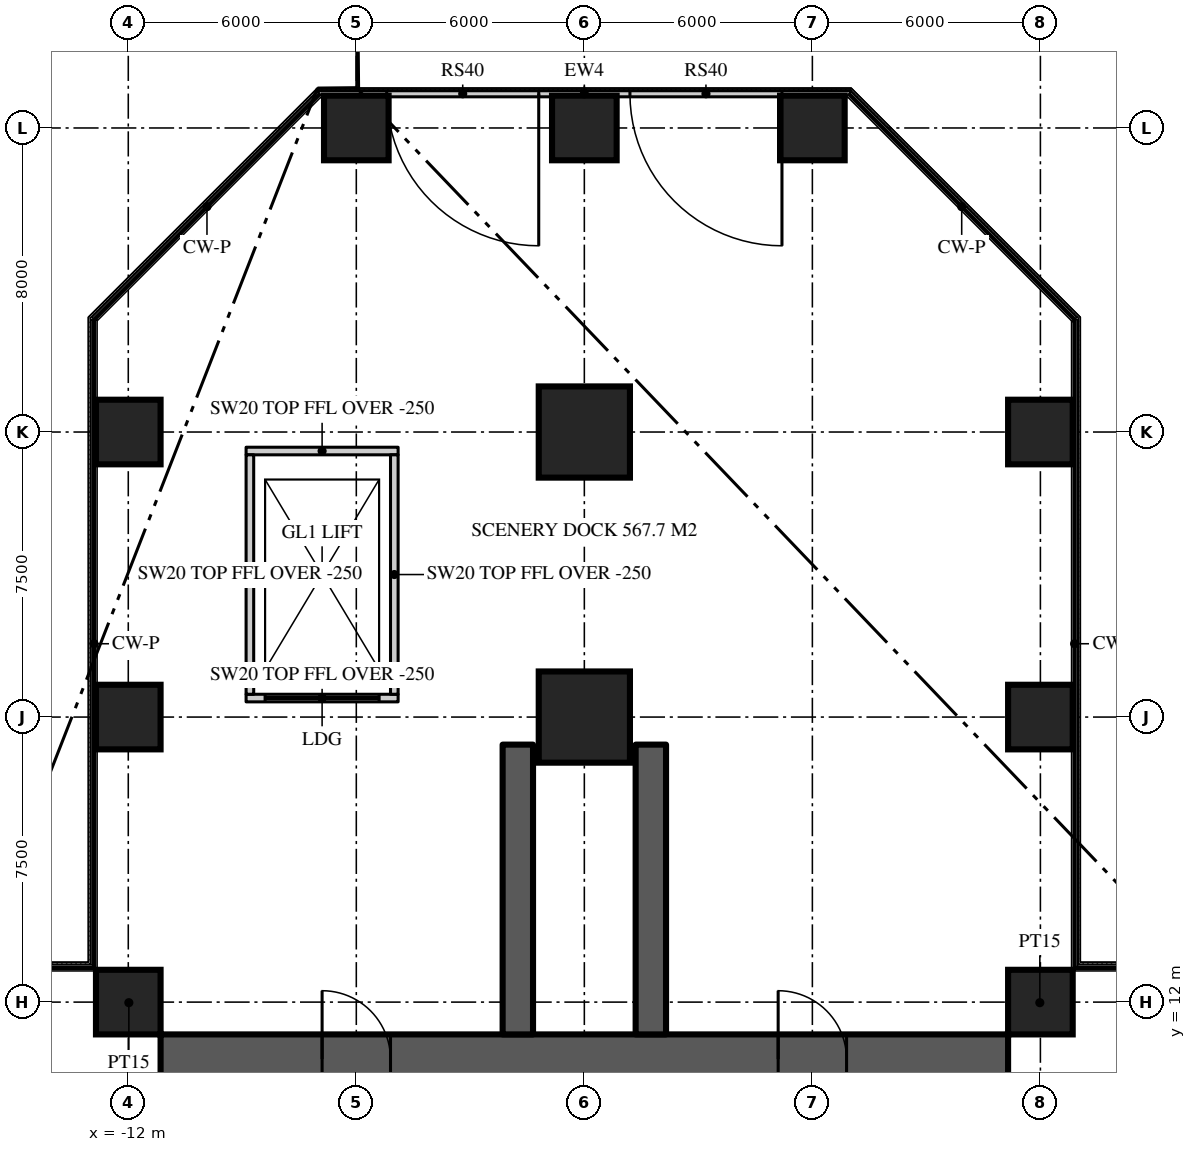
"""IFC4 building model, lengths in metres.
Left out: names, types, materials, properties, quantities, classifications, styles, units other than length and angle.
Written with IfcOpenShell. Run it as: python <this file> out.ifc"""

import sys

from ifc_helpers import new_model, si_unit, direction, frame, frame_2d, origin, origin_2d, place, context, subcontext, project, spatial, rectangle, extrude, element, fill, save


model = new_model("IFC4")
c1 = context("Model", 3, precision=1e-05, world=origin(), true_north=direction((0.0, 1.0)))
c2 = subcontext(c1, "Body", "Model", "MODEL_VIEW")
j1 = project(units=[si_unit("LENGTHUNIT", "METRE"), si_unit("PLANEANGLEUNIT", "RADIAN")], contexts=[c1])
p1 = place(None, origin())
s1 = spatial("IfcSite", under=j1, at=p1, CompositionType="ELEMENT")
p2 = place(p1, origin())
s2 = spatial("IfcBuilding", under=s1, at=p2, CompositionType="ELEMENT")
p3 = place(p2, origin())
s3 = spatial("IfcBuildingStorey", under=s2, at=p3, CompositionType="ELEMENT", Elevation=0.0)
p4 = place(p3, frame((-11.15, 10.5, 0.0), z_axis=(0.0, 0.0, 1.0), x_axis=(1.0, 0.0, 0.0)))
e1 = element("IfcWall", 1, at=p4, inside=s3, PredefinedType="SHEAR", context=c2, shape_type="SweptSolid", body=[
    extrude(rectangle(XDim=22.3, YDim=1.3, at=frame_2d((11.15, 0.0))), origin(), (0.0, 0.0, 1.0), 7.0),
])
p5 = place(p4, frame((4.25, 0.0, 0.0)))
e2 = element("IfcOpeningElement", 2, at=p5, cuts=e1, PredefinedType="OPENING", context=c2, shape_type="SweptSolid", body=[
    extrude(rectangle(XDim=1.8, YDim=2.2, at=frame_2d((0.9, 1.1))), frame((0.0, 0.66, 0.0), z_axis=(0.0, -1.0, 0.0), x_axis=(1.0, 0.0, 0.0)), (0.0, 0.0, 1.0), 1.32),
])
p6 = place(p4, frame((16.25, 0.0, 0.0)))
e3 = element("IfcOpeningElement", 3, at=p6, cuts=e1, PredefinedType="OPENING", context=c2, shape_type="SweptSolid", body=[
    extrude(rectangle(XDim=1.8, YDim=2.2, at=frame_2d((0.9, 1.1))), frame((0.0, 0.66, 0.0), z_axis=(0.0, -1.0, 0.0), x_axis=(1.0, 0.0, 0.0)), (0.0, 0.0, 1.0), 1.32),
])
for number, where, z_axis, x_axis in (
    (4, (1.75, 11.15, 0.0), (0.0, 0.0, 1.0), (0.0, 1.0, 0.0)),
    (5, (-1.75, 11.15, 0.0), (0.0, 0.0, 1.0), (0.0, 1.0, 0.0)),
):
    element("IfcWall", number, at=place(p3, frame(where, z_axis=z_axis, x_axis=x_axis)), inside=s3, PredefinedType="SHEAR", context=c2, shape_type="SweptSolid", body=[
        extrude(rectangle(XDim=7.625, YDim=0.8, at=frame_2d((3.812, 0.0))), origin(), (0.0, 0.0, 1.0), 7.0),
    ])
for number, where, z_axis, x_axis in (
    (6, (-12.0, 12.0, 0.0), (0.0, 0.0, 1.0), (1.0, 0.0, 0.0)),
    (7, (12.0, 12.0, 0.0), (0.0, 0.0, 1.0), (1.0, 0.0, 0.0)),
    (8, (-12.0, 19.5, 0.0), (0.0, 0.0, 1.0), (1.0, 0.0, 0.0)),
):
    element("IfcColumn", number, at=place(p3, frame(where, z_axis=z_axis, x_axis=x_axis)), inside=s3, PredefinedType="COLUMN", context=c2, shape_type="SweptSolid", body=[
        extrude(rectangle(XDim=1.7, YDim=1.7, at=origin_2d()), origin(), (0.0, 0.0, 1.0), 7.0),
    ])
p7 = place(p3, frame((0.0, 19.5, 0.0), z_axis=(0.0, 0.0, 1.0), x_axis=(1.0, 0.0, 0.0)))
e9 = element("IfcColumn", 9, at=p7, inside=s3, PredefinedType="COLUMN", context=c2, shape_type="SweptSolid", body=[
    extrude(rectangle(XDim=2.4, YDim=2.4, at=origin_2d()), origin(), (0.0, 0.0, 1.0), 7.0),
])
for number, where, z_axis, x_axis in (
    (10, (12.0, 19.5, 0.0), (0.0, 0.0, 1.0), (1.0, 0.0, 0.0)),
    (11, (-12.0, 27.0, 0.0), (0.0, 0.0, 1.0), (1.0, 0.0, 0.0)),
):
    element("IfcColumn", number, at=place(p3, frame(where, z_axis=z_axis, x_axis=x_axis)), inside=s3, PredefinedType="COLUMN", context=c2, shape_type="SweptSolid", body=[
        extrude(rectangle(XDim=1.7, YDim=1.7, at=origin_2d()), origin(), (0.0, 0.0, 1.0), 7.0),
    ])
p8 = place(p3, frame((0.0, 27.0, 0.0), z_axis=(0.0, 0.0, 1.0), x_axis=(1.0, 0.0, 0.0)))
e12 = element("IfcColumn", 12, at=p8, inside=s3, PredefinedType="COLUMN", context=c2, shape_type="SweptSolid", body=[
    extrude(rectangle(XDim=2.4, YDim=2.4, at=origin_2d()), origin(), (0.0, 0.0, 1.0), 7.0),
])
for number, where, z_axis, x_axis in (
    (13, (12.0, 27.0, 0.0), (0.0, 0.0, 1.0), (1.0, 0.0, 0.0)),
    (14, (-6.0, 35.0, 0.0), (0.0, 0.0, 1.0), (1.0, 0.0, 0.0)),
    (15, (0.0, 35.0, 0.0), (0.0, 0.0, 1.0), (1.0, 0.0, 0.0)),
    (16, (6.0, 35.0, 0.0), (0.0, 0.0, 1.0), (1.0, 0.0, 0.0)),
):
    element("IfcColumn", number, at=place(p3, frame(where, z_axis=z_axis, x_axis=x_axis)), inside=s3, PredefinedType="COLUMN", context=c2, shape_type="SweptSolid", body=[
        extrude(rectangle(XDim=1.7, YDim=1.7, at=origin_2d()), origin(), (0.0, 0.0, 1.0), 7.0),
    ])
p9 = place(p3, frame((7.009, 35.9, 0.0), z_axis=(0.0, 0.0, 1.0), x_axis=(-1.0, 0.0, 0.0)))
e17 = element("IfcWall", 17, at=p9, inside=s3, PredefinedType="SOLIDWALL", context=c2, shape_type="SweptSolid", body=[
    extrude(rectangle(XDim=14.017, YDim=0.16, at=frame_2d((7.009, 0.0))), origin(), (0.0, 0.0, 1.0), 6.75),
])
p10 = place(p9, frame((1.809, 0.0, 0.0)))
e18 = element("IfcOpeningElement", 18, at=p10, cuts=e17, PredefinedType="OPENING", context=c2, shape_type="SweptSolid", body=[
    extrude(rectangle(XDim=4.0, YDim=4.5, at=frame_2d((2.0, 2.25))), frame((0.0, 0.09, 0.0), z_axis=(0.0, -1.0, 0.0), x_axis=(1.0, 0.0, 0.0)), (0.0, 0.0, 1.0), 0.18),
])
p11 = place(p9, frame((8.208, 0.0, 0.0)))
e19 = element("IfcOpeningElement", 19, at=p11, cuts=e17, PredefinedType="OPENING", context=c2, shape_type="SweptSolid", body=[
    extrude(rectangle(XDim=4.0, YDim=4.5, at=frame_2d((2.0, 2.25))), frame((0.0, 0.09, 0.0), z_axis=(0.0, -1.0, 0.0), x_axis=(1.0, 0.0, 0.0)), (0.0, 0.0, 1.0), 0.18),
])
for number, where, z_axis, x_axis in (
    (20, (11.15, 11.15, 0.0), (0.0, 0.0, 1.0), (0.707, 0.707, 0.0)),
    (21, (-11.15, 11.15, 0.0), (0.0, 0.0, 1.0), (-0.707, 0.707, 0.0)),
):
    element("IfcWall", number, at=place(p3, frame(where, z_axis=z_axis, x_axis=x_axis)), inside=s3, PredefinedType="PARTITIONING", context=c2, shape_type="SweptSolid", body=[
        extrude(rectangle(XDim=2.362, YDim=0.15, at=frame_2d((1.181, 0.0))), origin(), (0.0, 0.0, 1.0), 6.75),
    ])
p12 = place(p3, frame((-4.9, 20.0, 0.0), z_axis=(0.0, 0.0, 1.0), x_axis=(-1.0, 0.0, 0.0)))
e22 = element("IfcWall", 22, at=p12, inside=s3, PredefinedType="SOLIDWALL", context=c2, shape_type="SweptSolid", body=[
    extrude(rectangle(XDim=4.0, YDim=0.2, at=frame_2d((2.0, 0.0))), origin(), (0.0, 0.0, 1.0), 6.75),
])
p13 = place(p12, frame((0.5, 0.0, 0.0)))
e23 = element("IfcOpeningElement", 23, at=p13, cuts=e22, PredefinedType="OPENING", context=c2, shape_type="SweptSolid", body=[
    extrude(rectangle(XDim=3.0, YDim=3.0, at=frame_2d((1.5, 1.5))), frame((0.0, 0.11, 0.0), z_axis=(0.0, -1.0, 0.0), x_axis=(1.0, 0.0, 0.0)), (0.0, 0.0, 1.0), 0.22),
])
p14 = place(p3, frame((-8.9, 26.5, 0.0), z_axis=(0.0, 0.0, 1.0), x_axis=(1.0, 0.0, 0.0)))
e24 = element("IfcWall", 24, at=p14, inside=s3, PredefinedType="SOLIDWALL", context=c2, shape_type="SweptSolid", body=[
    extrude(rectangle(XDim=4.0, YDim=0.2, at=frame_2d((2.0, 0.0))), origin(), (0.0, 0.0, 1.0), 6.75),
])
for number, where, z_axis, x_axis in (
    (25, (-5.0, 20.1, 0.0), (0.0, 0.0, 1.0), (0.0, 1.0, 0.0)),
    (26, (-8.8, 26.4, 0.0), (0.0, 0.0, 1.0), (0.0, -1.0, 0.0)),
):
    element("IfcWall", number, at=place(p3, frame(where, z_axis=z_axis, x_axis=x_axis)), inside=s3, PredefinedType="SOLIDWALL", context=c2, shape_type="SweptSolid", body=[
        extrude(rectangle(XDim=6.3, YDim=0.2, at=frame_2d((3.15, 0.0))), origin(), (0.0, 0.0, 1.0), 6.75),
    ])
p15 = place(p10, origin())
e27 = element("IfcDoor", 27, at=p15, inside=s3, OperationType="ROLLINGUP", PredefinedType="GATE", context=c2, shape_type="SweptSolid", body=[
    extrude(rectangle(XDim=4.0, YDim=4.5, at=frame_2d((2.0, 2.25))), frame((0.0, 0.025, 0.0), z_axis=(0.0, -1.0, 0.0), x_axis=(1.0, 0.0, 0.0)), (0.0, 0.0, 1.0), 0.05),
])
fill(e18, e27)
p16 = place(p11, origin())
e28 = element("IfcDoor", 28, at=p16, inside=s3, OperationType="ROLLINGUP", PredefinedType="GATE", context=c2, shape_type="SweptSolid", body=[
    extrude(rectangle(XDim=4.0, YDim=4.5, at=frame_2d((2.0, 2.25))), frame((0.0, 0.025, 0.0), z_axis=(0.0, -1.0, 0.0), x_axis=(1.0, 0.0, 0.0)), (0.0, 0.0, 1.0), 0.05),
])
fill(e19, e28)
p17 = place(p13, origin())
e29 = element("IfcDoor", 29, at=p17, inside=s3, OperationType="SLIDING_TO_LEFT", PredefinedType="DOOR", context=c2, shape_type="SweptSolid", body=[
    extrude(rectangle(XDim=3.0, YDim=3.0, at=frame_2d((1.5, 1.5))), frame((0.0, 0.025, 0.0), z_axis=(0.0, -1.0, 0.0), x_axis=(1.0, 0.0, 0.0)), (0.0, 0.0, 1.0), 0.05),
])
fill(e23, e29)
p18 = place(p5, origin())
e30 = element("IfcDoor", 30, at=p18, inside=s3, OperationType="DOUBLE_DOOR_DOUBLE_SWING", PredefinedType="DOOR", context=c2, shape_type="SweptSolid", body=[
    extrude(rectangle(XDim=1.8, YDim=2.2, at=frame_2d((0.9, 1.1))), frame((0.0, 0.025, 0.0), z_axis=(0.0, -1.0, 0.0), x_axis=(1.0, 0.0, 0.0)), (0.0, 0.0, 1.0), 0.05),
])
fill(e2, e30)
p19 = place(p6, origin())
e31 = element("IfcDoor", 31, at=p19, inside=s3, OperationType="DOUBLE_DOOR_DOUBLE_SWING", PredefinedType="DOOR", context=c2, shape_type="SweptSolid", body=[
    extrude(rectangle(XDim=1.8, YDim=2.2, at=frame_2d((0.9, 1.1))), frame((0.0, 0.025, 0.0), z_axis=(0.0, -1.0, 0.0), x_axis=(1.0, 0.0, 0.0)), (0.0, 0.0, 1.0), 0.05),
])
fill(e3, e31)
save(model, sys.argv[1])
